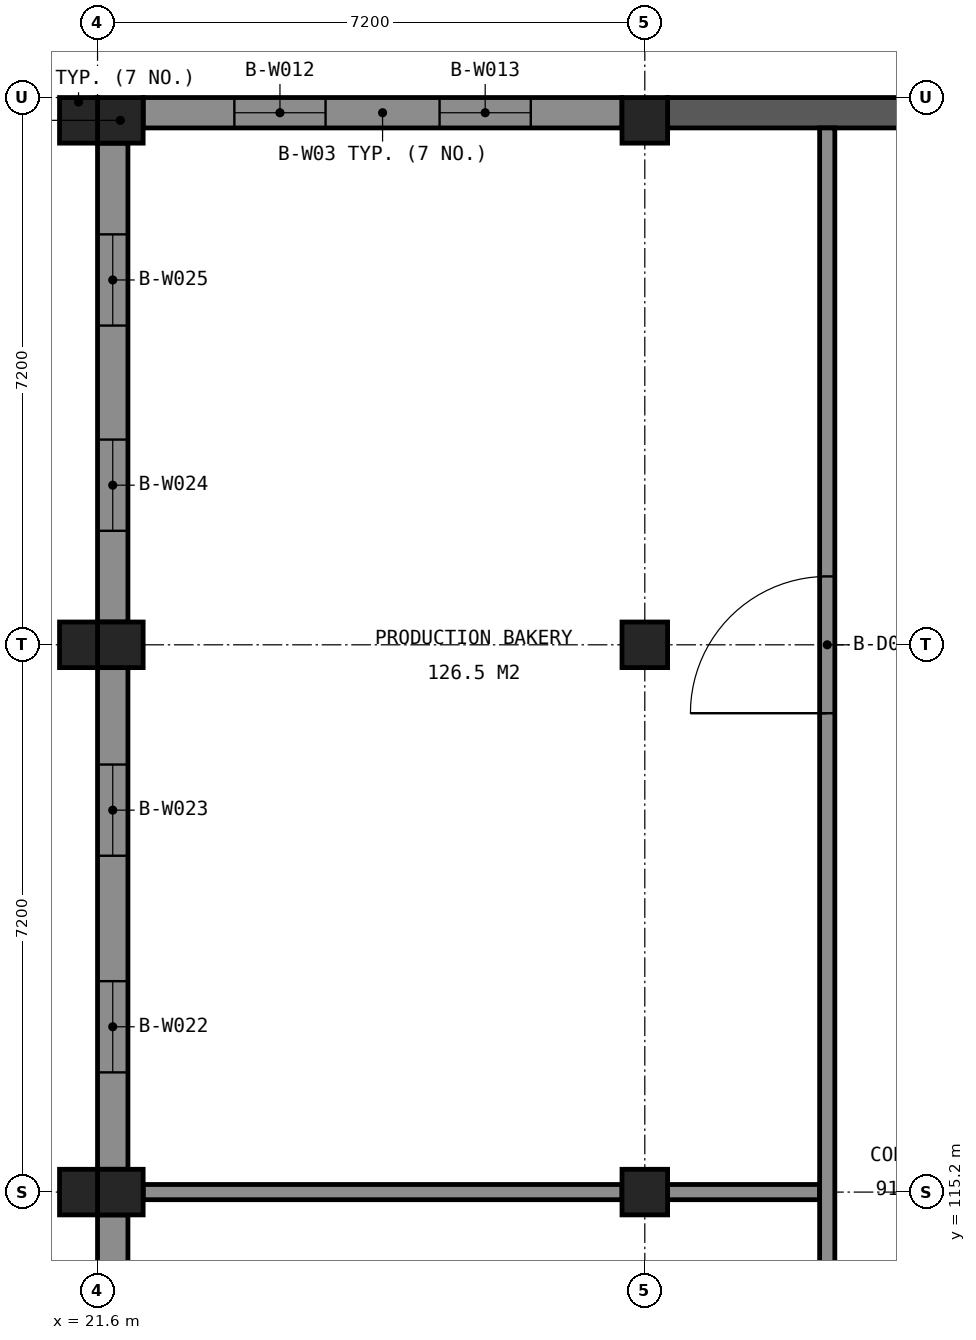
"""IFC4 building model, lengths in metres.
Left out: names, types, materials, properties, quantities, classifications, styles, units other than length and angle.
Written with IfcOpenShell. Run it as: python <this file> out.ifc"""

import sys

from ifc_helpers import new_model, si_unit, direction, frame, frame_2d, origin, origin_2d, place, context, subcontext, project, spatial, rectangle, extrude, element, fill, save


model = new_model("IFC4")
c1 = context("Model", 3, precision=1e-05, world=origin(), true_north=direction((0.0, 1.0)))
c2 = subcontext(c1, "Body", "Model", "MODEL_VIEW")
j1 = project(units=[si_unit("LENGTHUNIT", "METRE"), si_unit("PLANEANGLEUNIT", "RADIAN")], contexts=[c1])
p1 = place(None, origin())
s1 = spatial("IfcSite", under=j1, at=p1, CompositionType="ELEMENT")
p2 = place(p1, origin())
s2 = spatial("IfcBuilding", under=s1, at=p2, CompositionType="ELEMENT")
p3 = place(p2, frame((0.0, 0.0, 4.8)))
s3 = spatial("IfcBuildingStorey", under=s2, at=p3, CompositionType="ELEMENT", Elevation=4.8)
for number, where, z_axis, x_axis in (
    (1, (21.9, 129.3, 0.0), (0.0, 0.0, 1.0), (1.0, 0.0, 0.0)),
    (2, (21.9, 122.4, 0.0), (0.0, 0.0, 1.0), (1.0, 0.0, 0.0)),
    (3, (21.9, 115.2, 0.0), (0.0, 0.0, 1.0), (1.0, 0.0, 0.0)),
    (4, (28.8, 129.3, 0.0), (0.0, 0.0, 1.0), (1.0, 0.0, 0.0)),
    (5, (28.8, 122.4, 0.0), (0.0, 0.0, 1.0), (1.0, 0.0, 0.0)),
    (6, (28.8, 115.2, 0.0), (0.0, 0.0, 1.0), (1.0, 0.0, 0.0)),
):
    element("IfcColumn", number, at=place(p3, frame(where, z_axis=z_axis, x_axis=x_axis)), inside=s3, PredefinedType="COLUMN", context=c2, shape_type="SweptSolid", body=[
        extrude(rectangle(XDim=0.6, YDim=0.6, at=origin_2d()), origin(), (0.0, 0.0, 1.0), 4.8),
    ])
p4 = place(p3, frame((29.1, 129.4, 0.0), z_axis=(0.0, 0.0, 1.0), x_axis=(1.0, 0.0, 0.0)))
e7 = element("IfcWall", 7, at=p4, inside=s3, PredefinedType="SHEAR", context=c2, shape_type="SweptSolid", body=[
    extrude(rectangle(XDim=13.7, YDim=0.4, at=frame_2d((6.85, 0.0))), origin(), (0.0, 0.0, 1.0), 4.55),
])
p5 = place(p3, frame((22.2, 129.4, 0.0), z_axis=(0.0, 0.0, 1.0), x_axis=(1.0, 0.0, 0.0)))
e8 = element("IfcWall", 8, at=p5, inside=s3, PredefinedType="SOLIDWALL", context=c2, shape_type="SweptSolid", body=[
    extrude(rectangle(XDim=6.3, YDim=0.4, at=frame_2d((3.15, 0.0))), origin(), (0.0, 0.0, 1.0), 3.95),
])
p6 = place(p5, frame((1.2, 0.0, 0.9)))
e9 = element("IfcOpeningElement", 9, at=p6, cuts=e8, PredefinedType="OPENING", context=c2, shape_type="SweptSolid", body=[
    extrude(rectangle(XDim=1.2, YDim=2.4, at=frame_2d((0.6, 1.2))), frame((0.0, 0.21, 0.0), z_axis=(0.0, -1.0, 0.0), x_axis=(1.0, 0.0, 0.0)), (0.0, 0.0, 1.0), 0.42),
])
p7 = place(p5, frame((3.9, 0.0, 0.9)))
e10 = element("IfcOpeningElement", 10, at=p7, cuts=e8, PredefinedType="OPENING", context=c2, shape_type="SweptSolid", body=[
    extrude(rectangle(XDim=1.2, YDim=2.4, at=frame_2d((0.6, 1.2))), frame((0.0, 0.21, 0.0), z_axis=(0.0, -1.0, 0.0), x_axis=(1.0, 0.0, 0.0)), (0.0, 0.0, 1.0), 0.42),
])
p8 = place(p3, frame((21.8, 108.3, 0.0), z_axis=(0.0, 0.0, 1.0), x_axis=(0.0, 1.0, 0.0)))
e11 = element("IfcWall", 11, at=p8, inside=s3, PredefinedType="SOLIDWALL", context=c2, shape_type="SweptSolid", body=[
    extrude(rectangle(XDim=6.6, YDim=0.4, at=frame_2d((3.3, 0.0))), origin(), (0.0, 0.0, 1.0), 3.95),
])
p9 = place(p8, frame((1.275, 0.0, 0.9)))
e12 = element("IfcOpeningElement", 12, at=p9, cuts=e11, PredefinedType="OPENING", context=c2, shape_type="SweptSolid", body=[
    extrude(rectangle(XDim=1.2, YDim=2.4, at=frame_2d((0.6, 1.2))), frame((0.0, 0.21, 0.0), z_axis=(0.0, -1.0, 0.0), x_axis=(1.0, 0.0, 0.0)), (0.0, 0.0, 1.0), 0.42),
])
p10 = place(p8, frame((4.125, 0.0, 0.9)))
e13 = element("IfcOpeningElement", 13, at=p10, cuts=e11, PredefinedType="OPENING", context=c2, shape_type="SweptSolid", body=[
    extrude(rectangle(XDim=1.2, YDim=2.4, at=frame_2d((0.6, 1.2))), frame((0.0, 0.21, 0.0), z_axis=(0.0, -1.0, 0.0), x_axis=(1.0, 0.0, 0.0)), (0.0, 0.0, 1.0), 0.42),
])
p11 = place(p3, frame((21.8, 115.5, 0.0), z_axis=(0.0, 0.0, 1.0), x_axis=(0.0, 1.0, 0.0)))
e14 = element("IfcWall", 14, at=p11, inside=s3, PredefinedType="SOLIDWALL", context=c2, shape_type="SweptSolid", body=[
    extrude(rectangle(XDim=6.6, YDim=0.4, at=frame_2d((3.3, 0.0))), origin(), (0.0, 0.0, 1.0), 3.95),
])
p12 = place(p11, frame((1.275, 0.0, 0.9)))
e15 = element("IfcOpeningElement", 15, at=p12, cuts=e14, PredefinedType="OPENING", context=c2, shape_type="SweptSolid", body=[
    extrude(rectangle(XDim=1.2, YDim=2.4, at=frame_2d((0.6, 1.2))), frame((0.0, 0.21, 0.0), z_axis=(0.0, -1.0, 0.0), x_axis=(1.0, 0.0, 0.0)), (0.0, 0.0, 1.0), 0.42),
])
p13 = place(p11, frame((4.125, 0.0, 0.9)))
e16 = element("IfcOpeningElement", 16, at=p13, cuts=e14, PredefinedType="OPENING", context=c2, shape_type="SweptSolid", body=[
    extrude(rectangle(XDim=1.2, YDim=2.4, at=frame_2d((0.6, 1.2))), frame((0.0, 0.21, 0.0), z_axis=(0.0, -1.0, 0.0), x_axis=(1.0, 0.0, 0.0)), (0.0, 0.0, 1.0), 0.42),
])
p14 = place(p3, frame((21.8, 122.7, 0.0), z_axis=(0.0, 0.0, 1.0), x_axis=(0.0, 1.0, 0.0)))
e17 = element("IfcWall", 17, at=p14, inside=s3, PredefinedType="SOLIDWALL", context=c2, shape_type="SweptSolid", body=[
    extrude(rectangle(XDim=6.3, YDim=0.4, at=frame_2d((3.15, 0.0))), origin(), (0.0, 0.0, 1.0), 3.95),
])
p15 = place(p14, frame((1.2, 0.0, 0.9)))
e18 = element("IfcOpeningElement", 18, at=p15, cuts=e17, PredefinedType="OPENING", context=c2, shape_type="SweptSolid", body=[
    extrude(rectangle(XDim=1.2, YDim=2.4, at=frame_2d((0.6, 1.2))), frame((0.0, 0.21, 0.0), z_axis=(0.0, -1.0, 0.0), x_axis=(1.0, 0.0, 0.0)), (0.0, 0.0, 1.0), 0.42),
])
p16 = place(p14, frame((3.9, 0.0, 0.9)))
e19 = element("IfcOpeningElement", 19, at=p16, cuts=e17, PredefinedType="OPENING", context=c2, shape_type="SweptSolid", body=[
    extrude(rectangle(XDim=1.2, YDim=2.4, at=frame_2d((0.6, 1.2))), frame((0.0, 0.21, 0.0), z_axis=(0.0, -1.0, 0.0), x_axis=(1.0, 0.0, 0.0)), (0.0, 0.0, 1.0), 0.42),
])
for number, where, z_axis, x_axis in (
    (20, (21.35, 115.2, 0.0), (0.0, 0.0, 1.0), (1.0, 0.0, 0.0)),
    (21, (21.35, 122.4, 0.0), (0.0, 0.0, 1.0), (1.0, 0.0, 0.0)),
    (22, (21.35, 129.3, 0.0), (0.0, 0.0, 1.0), (1.0, 0.0, 0.0)),
):
    element("IfcColumn", number, at=place(p3, frame(where, z_axis=z_axis, x_axis=x_axis)), inside=s3, PredefinedType="COLUMN", context=c2, shape_type="SweptSolid", body=[
        extrude(rectangle(XDim=0.5, YDim=0.6, at=origin_2d()), origin(), (0.0, 0.0, 1.0), 4.8),
    ])
p17 = place(p3, frame((22.2, 115.2, 0.0), z_axis=(0.0, 0.0, 1.0), x_axis=(1.0, 0.0, 0.0)))
e23 = element("IfcWall", 23, at=p17, inside=s3, PredefinedType="PARTITIONING", context=c2, shape_type="SweptSolid", body=[
    extrude(rectangle(XDim=6.3, YDim=0.2, at=frame_2d((3.15, 0.0))), origin(), (0.0, 0.0, 1.0), 3.95),
])
p18 = place(p3, frame((29.1, 115.2, 0.0), z_axis=(0.0, 0.0, 1.0), x_axis=(1.0, 0.0, 0.0)))
e24 = element("IfcWall", 24, at=p18, inside=s3, PredefinedType="PARTITIONING", context=c2, shape_type="SweptSolid", body=[
    extrude(rectangle(XDim=2.0, YDim=0.2, at=frame_2d((1.0, 0.0))), origin(), (0.0, 0.0, 1.0), 3.95),
])
p19 = place(p3, frame((31.2, 86.8, 0.0), z_axis=(0.0, 0.0, 1.0), x_axis=(0.0, 1.0, 0.0)))
e25 = element("IfcWall", 25, at=p19, inside=s3, PredefinedType="PARTITIONING", context=c2, shape_type="SweptSolid", body=[
    extrude(rectangle(XDim=42.4, YDim=0.2, at=frame_2d((21.2, 0.0))), origin(), (0.0, 0.0, 1.0), 3.95),
])
p20 = place(p19, frame((34.7, 0.0, 0.0)))
e26 = element("IfcOpeningElement", 26, at=p20, cuts=e25, PredefinedType="OPENING", context=c2, shape_type="SweptSolid", body=[
    extrude(rectangle(XDim=1.8, YDim=2.1, at=frame_2d((0.9, 1.05))), frame((0.0, 0.11, 0.0), z_axis=(0.0, -1.0, 0.0), x_axis=(1.0, 0.0, 0.0)), (0.0, 0.0, 1.0), 0.22),
])
p21 = place(p19, frame((20.3, 0.0, 0.0)))
e27 = element("IfcOpeningElement", 27, at=p21, cuts=e25, PredefinedType="OPENING", context=c2, shape_type="SweptSolid", body=[
    extrude(rectangle(XDim=1.8, YDim=2.1, at=frame_2d((0.9, 1.05))), frame((0.0, 0.11, 0.0), z_axis=(0.0, -1.0, 0.0), x_axis=(1.0, 0.0, 0.0)), (0.0, 0.0, 1.0), 0.22),
])
p22 = place(p19, frame((5.9, 0.0, 0.0)))
e28 = element("IfcOpeningElement", 28, at=p22, cuts=e25, PredefinedType="OPENING", context=c2, shape_type="SweptSolid", body=[
    extrude(rectangle(XDim=1.8, YDim=2.1, at=frame_2d((0.9, 1.05))), frame((0.0, 0.11, 0.0), z_axis=(0.0, -1.0, 0.0), x_axis=(1.0, 0.0, 0.0)), (0.0, 0.0, 1.0), 0.22),
])
p23 = place(p6, origin())
e29 = element("IfcWindow", 29, at=p23, inside=s3, PartitioningType="SINGLE_PANEL", PredefinedType="WINDOW", context=c2, shape_type="SweptSolid", body=[
    extrude(rectangle(XDim=1.2, YDim=2.4, at=frame_2d((0.6, 1.2))), frame((0.0, 0.03, 0.0), z_axis=(0.0, -1.0, 0.0), x_axis=(1.0, 0.0, 0.0)), (0.0, 0.0, 1.0), 0.06),
])
fill(e9, e29)
p24 = place(p7, origin())
e30 = element("IfcWindow", 30, at=p24, inside=s3, PartitioningType="SINGLE_PANEL", PredefinedType="WINDOW", context=c2, shape_type="SweptSolid", body=[
    extrude(rectangle(XDim=1.2, YDim=2.4, at=frame_2d((0.6, 1.2))), frame((0.0, 0.03, 0.0), z_axis=(0.0, -1.0, 0.0), x_axis=(1.0, 0.0, 0.0)), (0.0, 0.0, 1.0), 0.06),
])
fill(e10, e30)
p25 = place(p12, origin())
e31 = element("IfcWindow", 31, at=p25, inside=s3, PartitioningType="SINGLE_PANEL", PredefinedType="WINDOW", context=c2, shape_type="SweptSolid", body=[
    extrude(rectangle(XDim=1.2, YDim=2.4, at=frame_2d((0.6, 1.2))), frame((0.0, 0.03, 0.0), z_axis=(0.0, -1.0, 0.0), x_axis=(1.0, 0.0, 0.0)), (0.0, 0.0, 1.0), 0.06),
])
fill(e15, e31)
p26 = place(p13, origin())
e32 = element("IfcWindow", 32, at=p26, inside=s3, PartitioningType="SINGLE_PANEL", PredefinedType="WINDOW", context=c2, shape_type="SweptSolid", body=[
    extrude(rectangle(XDim=1.2, YDim=2.4, at=frame_2d((0.6, 1.2))), frame((0.0, 0.03, 0.0), z_axis=(0.0, -1.0, 0.0), x_axis=(1.0, 0.0, 0.0)), (0.0, 0.0, 1.0), 0.06),
])
fill(e16, e32)
p27 = place(p15, origin())
e33 = element("IfcWindow", 33, at=p27, inside=s3, PartitioningType="SINGLE_PANEL", PredefinedType="WINDOW", context=c2, shape_type="SweptSolid", body=[
    extrude(rectangle(XDim=1.2, YDim=2.4, at=frame_2d((0.6, 1.2))), frame((0.0, 0.03, 0.0), z_axis=(0.0, -1.0, 0.0), x_axis=(1.0, 0.0, 0.0)), (0.0, 0.0, 1.0), 0.06),
])
fill(e18, e33)
p28 = place(p16, origin())
e34 = element("IfcWindow", 34, at=p28, inside=s3, PartitioningType="SINGLE_PANEL", PredefinedType="WINDOW", context=c2, shape_type="SweptSolid", body=[
    extrude(rectangle(XDim=1.2, YDim=2.4, at=frame_2d((0.6, 1.2))), frame((0.0, 0.03, 0.0), z_axis=(0.0, -1.0, 0.0), x_axis=(1.0, 0.0, 0.0)), (0.0, 0.0, 1.0), 0.06),
])
fill(e19, e34)
p29 = place(p20, origin())
e35 = element("IfcDoor", 35, at=p29, inside=s3, OperationType="DOUBLE_DOOR_DOUBLE_SWING", PredefinedType="DOOR", context=c2, shape_type="SweptSolid", body=[
    extrude(rectangle(XDim=1.8, YDim=2.1, at=frame_2d((0.9, 1.05))), frame((0.0, 0.025, 0.0), z_axis=(0.0, -1.0, 0.0), x_axis=(1.0, 0.0, 0.0)), (0.0, 0.0, 1.0), 0.05),
])
fill(e26, e35)
save(model, sys.argv[1])
